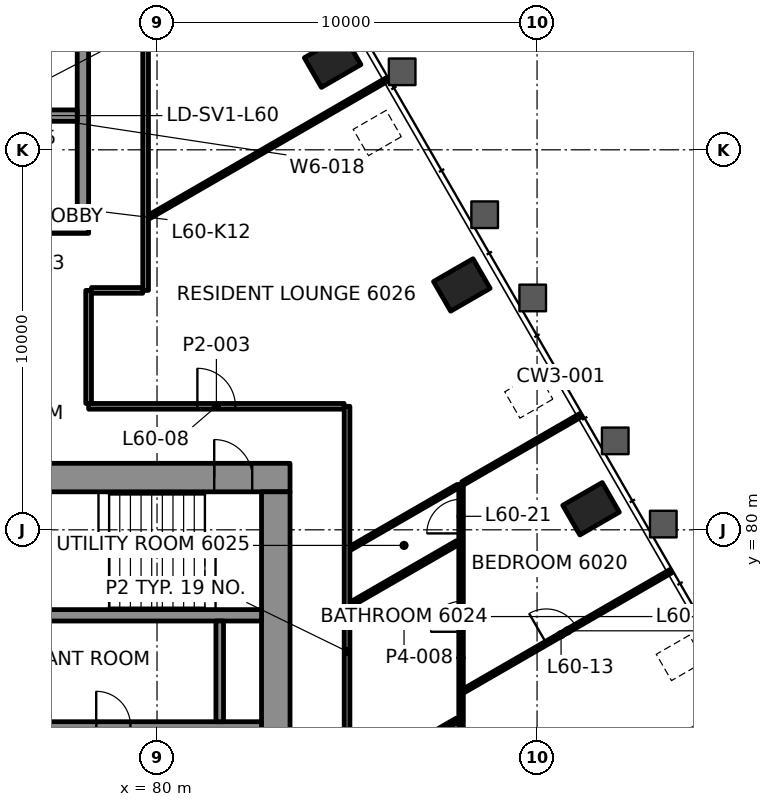
"""IFC4 building model, lengths in metres.
Left out: names, types, materials, properties, quantities, classifications, styles, units other than length and angle.
Written with IfcOpenShell. Run it as: python <this file> out.ifc"""

import sys

from ifc_helpers import new_model, si_unit, direction, frame, frame_2d, origin, origin_2d, place, context, subcontext, project, spatial, rectangle, hollow_rectangle, extrude, element, fill, save


model = new_model("IFC4")
c1 = context("Model", 3, precision=1e-05, world=origin(), true_north=direction((0.0, 1.0)))
c2 = subcontext(c1, "Body", "Model", "MODEL_VIEW")
j1 = project(units=[si_unit("LENGTHUNIT", "METRE"), si_unit("PLANEANGLEUNIT", "RADIAN")], contexts=[c1])
p1 = place(None, origin())
s1 = spatial("IfcSite", under=j1, at=p1, CompositionType="ELEMENT")
p2 = place(p1, origin())
s2 = spatial("IfcBuilding", under=s1, at=p2, CompositionType="ELEMENT")
p3 = place(p2, frame((0.0, 0.0, 256.6)))
s3 = spatial("IfcBuildingStorey", under=s2, at=p3, CompositionType="ELEMENT", Elevation=256.6)
for number, where, z_axis, x_axis in (
    (1, (94.821, 74.666, -0.0), (0.0, 0.0, 1.0), (-0.5, 0.866, 0.0)),
    (2, (91.421, 80.554, -0.0), (0.0, 0.0, 1.0), (-0.5, 0.866, 0.0)),
    (3, (88.021, 86.443, -0.0), (0.0, 0.0, 1.0), (-0.5, 0.866, 0.0)),
    (4, (84.621, 92.332, -0.0), (0.0, 0.0, 1.0), (-0.5, 0.866, 0.0)),
):
    element("IfcColumn", number, at=place(p3, frame(where, z_axis=z_axis, x_axis=x_axis)), inside=s3, PredefinedType="COLUMN", context=c2, shape_type="SweptSolid", body=[
        extrude(hollow_rectangle(XDim=0.9, YDim=1.2, WallThickness=0.06, at=origin_2d()), origin(), (0.0, 0.0, 1.0), 3.5),
    ])
p4 = place(p3, frame((66.5, 81.375, 0.0), z_axis=(0.0, 0.0, 1.0), x_axis=(1.0, 0.0, 0.0)))
e5 = element("IfcWall", 5, at=p4, inside=s3, PredefinedType="SHEAR", context=c2, shape_type="SweptSolid", body=[
    extrude(rectangle(XDim=17.0, YDim=0.75, at=frame_2d((8.5, 0.0))), origin(), (0.0, 0.0, 1.0), 3.3),
])
p5 = place(p4, frame((1.195, 0.0, 0.0)))
e6 = element("IfcOpeningElement", 6, at=p5, cuts=e5, PredefinedType="OPENING", context=c2, shape_type="SweptSolid", body=[
    extrude(rectangle(XDim=1.0, YDim=2.1, at=frame_2d((0.5, 1.05))), frame((0.0, 0.385, 0.0), z_axis=(0.0, -1.0, 0.0), x_axis=(1.0, 0.0, 0.0)), (0.0, 0.0, 1.0), 0.77),
])
p6 = place(p4, frame((15.005, 0.0, 0.0)))
e7 = element("IfcOpeningElement", 7, at=p6, cuts=e5, PredefinedType="OPENING", context=c2, shape_type="SweptSolid", body=[
    extrude(rectangle(XDim=1.0, YDim=2.1, at=frame_2d((0.5, 1.05))), frame((0.0, 0.385, 0.0), z_axis=(0.0, -1.0, 0.0), x_axis=(1.0, 0.0, 0.0)), (0.0, 0.0, 1.0), 0.77),
])
p7 = place(p4, frame((8.15, 0.0, 0.0)))
e8 = element("IfcOpeningElement", 8, at=p7, cuts=e5, PredefinedType="OPENING", context=c2, shape_type="SweptSolid", body=[
    extrude(rectangle(XDim=0.9, YDim=2.1, at=frame_2d((0.45, 1.05))), frame((0.0, 0.385, 0.0), z_axis=(0.0, -1.0, 0.0), x_axis=(1.0, 0.0, 0.0)), (0.0, 0.0, 1.0), 0.77),
])
p8 = place(p3, frame((83.125, 69.0, 0.0), z_axis=(0.0, 0.0, 1.0), x_axis=(0.0, 1.0, 0.0)))
e9 = element("IfcWall", 9, at=p8, inside=s3, PredefinedType="SHEAR", context=c2, shape_type="SweptSolid", body=[
    extrude(rectangle(XDim=12.0, YDim=0.75, at=frame_2d((6.0, 0.0))), origin(), (0.0, 0.0, 1.0), 3.3),
])
p9 = place(p8, frame((3.4, 0.0, 0.0)))
e10 = element("IfcOpeningElement", 10, at=p9, cuts=e9, PredefinedType="OPENING", context=c2, shape_type="SweptSolid", body=[
    extrude(rectangle(XDim=1.8, YDim=2.1, at=frame_2d((0.9, 1.05))), frame((0.0, 0.385, 0.0), z_axis=(0.0, -1.0, 0.0), x_axis=(1.0, 0.0, 0.0)), (0.0, 0.0, 1.0), 0.77),
])
p10 = place(p3, frame((67.25, 77.75, 0.0), z_axis=(0.0, 0.0, 1.0), x_axis=(1.0, 0.0, 0.0)))
e11 = element("IfcWall", 11, at=p10, inside=s3, PredefinedType="SHEAR", context=c2, shape_type="SweptSolid", body=[
    extrude(rectangle(XDim=15.5, YDim=0.3, at=frame_2d((7.75, 0.0))), origin(), (0.0, 0.0, 1.0), 3.3),
])
p11 = place(p10, frame((0.445, 0.0, 0.0)))
e12 = element("IfcOpeningElement", 12, at=p11, cuts=e11, PredefinedType="OPENING", context=c2, shape_type="SweptSolid", body=[
    extrude(rectangle(XDim=1.0, YDim=2.1, at=frame_2d((0.5, 1.05))), frame((0.0, 0.16, 0.0), z_axis=(0.0, -1.0, 0.0), x_axis=(1.0, 0.0, 0.0)), (0.0, 0.0, 1.0), 0.32),
])
p12 = place(p3, frame((71.8, 87.95, 0.0), z_axis=(0.0, 0.0, 1.0), x_axis=(1.0, 0.0, 0.0)))
e13 = element("IfcWall", 13, at=p12, inside=s3, PredefinedType="SHEAR", context=c2, shape_type="SweptSolid", body=[
    extrude(rectangle(XDim=6.4, YDim=0.3, at=frame_2d((3.2, 0.0))), origin(), (0.0, 0.0, 1.0), 3.3),
])
p13 = place(p12, frame((1.325, 0.0, 0.0)))
e14 = element("IfcOpeningElement", 14, at=p13, cuts=e13, PredefinedType="OPENING", context=c2, shape_type="SweptSolid", body=[
    extrude(rectangle(XDim=1.0, YDim=2.1, at=frame_2d((0.5, 1.05))), frame((0.0, 0.16, 0.0), z_axis=(0.0, -1.0, 0.0), x_axis=(1.0, 0.0, 0.0)), (0.0, 0.0, 1.0), 0.32),
])
p14 = place(p12, frame((4.125, 0.0, 0.0)))
e15 = element("IfcOpeningElement", 15, at=p14, cuts=e13, PredefinedType="OPENING", context=c2, shape_type="SweptSolid", body=[
    extrude(rectangle(XDim=1.2, YDim=2.1, at=frame_2d((0.6, 1.05))), frame((0.0, 0.16, 0.0), z_axis=(0.0, -1.0, 0.0), x_axis=(1.0, 0.0, 0.0)), (0.0, 0.0, 1.0), 0.32),
])
p15 = place(p3, frame((78.05, 88.1, 0.0), z_axis=(0.0, 0.0, 1.0), x_axis=(0.0, 1.0, 0.0)))
e16 = element("IfcWall", 16, at=p15, inside=s3, PredefinedType="SHEAR", context=c2, shape_type="SweptSolid", body=[
    extrude(rectangle(XDim=6.2, YDim=0.3, at=frame_2d((3.1, 0.0))), origin(), (0.0, 0.0, 1.0), 3.3),
])
p16 = place(p3, frame((75.3, 90.9, 0.0), z_axis=(0.0, 0.0, 1.0), x_axis=(1.0, 0.0, 0.0)))
e17 = element("IfcWall", 17, at=p16, inside=s3, PredefinedType="SHEAR", context=c2, shape_type="SweptSolid", body=[
    extrude(rectangle(XDim=2.6, YDim=0.3, at=frame_2d((1.3, 0.0))), origin(), (0.0, 0.0, 1.0), 3.3),
])
p17 = place(p16, frame((0.675, 0.0, 0.0)))
e18 = element("IfcOpeningElement", 18, at=p17, cuts=e17, PredefinedType="OPENING", context=c2, shape_type="SweptSolid", body=[
    extrude(rectangle(XDim=1.1, YDim=2.1, at=frame_2d((0.55, 1.05))), frame((0.0, 0.16, 0.0), z_axis=(0.0, -1.0, 0.0), x_axis=(1.0, 0.0, 0.0)), (0.0, 0.0, 1.0), 0.32),
])
p18 = place(p3, frame((78.2, 83.25, 0.0), z_axis=(0.0, 0.0, 1.0), x_axis=(1.0, 0.0, 0.0)))
e19 = element("IfcWall", 19, at=p18, inside=s3, PredefinedType="PARTITIONING", context=c2, shape_type="SweptSolid", body=[
    extrude(rectangle(XDim=6.725, YDim=0.15, at=frame_2d((3.362, 0.0))), origin(), (0.0, 0.0, 1.0), 2.7),
])
p19 = place(p18, frame((2.862, 0.0, 0.0)))
e20 = element("IfcOpeningElement", 20, at=p19, cuts=e19, PredefinedType="OPENING", context=c2, shape_type="SweptSolid", body=[
    extrude(rectangle(XDim=1.0, YDim=2.1, at=frame_2d((0.5, 1.05))), frame((0.0, 0.085, 0.0), z_axis=(0.0, -1.0, 0.0), x_axis=(1.0, 0.0, 0.0)), (0.0, 0.0, 1.0), 0.17),
])
p20 = place(p3, frame((78.275, 86.3, 0.0), z_axis=(0.0, 0.0, 1.0), x_axis=(1.0, 0.0, 0.0)))
e21 = element("IfcWall", 21, at=p20, inside=s3, PredefinedType="PARTITIONING", context=c2, shape_type="SweptSolid", body=[
    extrude(rectangle(XDim=1.35, YDim=0.15, at=frame_2d((0.675, 0.0))), origin(), (0.0, 0.0, 1.0), 2.7),
])
p21 = place(p3, frame((85.11, 73.379, 0.0), z_axis=(0.0, 0.0, 1.0), x_axis=(0.866000447062, 0.500043223821, 0.0)))
e22 = element("IfcWall", 22, at=p21, inside=s3, PredefinedType="PARTITIONING", context=c2, shape_type="SweptSolid", body=[
    extrude(rectangle(XDim=3.228, YDim=0.12, at=frame_2d((1.614, 0.0))), origin(), (0.0, 0.0, 1.0), 2.7),
])
p22 = place(p3, frame((88.086, 75.773, 0.0), z_axis=(0.0, 0.0, 1.0), x_axis=(0.866028229963, 0.499995104884, 0.0)))
e23 = element("IfcWall", 23, at=p22, inside=s3, PredefinedType="PARTITIONING", context=c2, shape_type="SweptSolid", body=[
    extrude(rectangle(XDim=6.278, YDim=0.1, at=frame_2d((3.139, 0.0))), origin(), (0.0, 0.0, 1.0), 2.688),
])
p23 = place(p22, frame((2.489, 0.0, 0.0)))
e24 = element("IfcOpeningElement", 24, at=p23, cuts=e23, PredefinedType="OPENING", context=c2, shape_type="SweptSolid", body=[
    extrude(rectangle(XDim=0.9, YDim=2.1, at=frame_2d((0.45, 1.05))), frame((0.0, 0.06, 0.0), z_axis=(0.0, -1.0, 0.0), x_axis=(1.0, 0.0, 0.0)), (0.0, 0.0, 1.0), 0.12),
])
p24 = place(p3, frame((85.109, 78.046, 0.0), z_axis=(0.0, 0.0, 1.0), x_axis=(0.866033195618, 0.499986503906, 0.0)))
e25 = element("IfcWall", 25, at=p24, inside=s3, PredefinedType="PARTITIONING", context=c2, shape_type="SweptSolid", body=[
    extrude(rectangle(XDim=3.228, YDim=0.12, at=frame_2d((1.614, 0.0))), origin(), (0.0, 0.0, 1.0), 2.7),
])
p25 = place(p3, frame((85.101, 79.523, 0.0), z_axis=(0.0, 0.0, 1.0), x_axis=(0.866029195513, 0.499993432475, 0.0)))
e26 = element("IfcWall", 26, at=p25, inside=s3, PredefinedType="PARTITIONING", context=c2, shape_type="SweptSolid", body=[
    extrude(rectangle(XDim=3.25, YDim=0.1, at=frame_2d((1.625, 0.0))), origin(), (0.0, 0.0, 1.0), 2.7),
])
p26 = place(p3, frame((79.801, 88.241, 0.0), z_axis=(0.0, 0.0, 1.0), x_axis=(0.866016076598, 0.500016154812, 0.0)))
e27 = element("IfcWall", 27, at=p26, inside=s3, PredefinedType="PARTITIONING", context=c2, shape_type="SweptSolid", body=[
    extrude(rectangle(XDim=7.219, YDim=0.1, at=frame_2d((3.61, 0.0))), origin(), (0.0, 0.0, 1.0), 2.688),
])
p27 = place(p3, frame((88.0, 72.067, 0.0), z_axis=(0.0, 0.0, 1.0), x_axis=(0.0, 1.0, 0.0)))
e28 = element("IfcWall", 28, at=p27, inside=s3, PredefinedType="PARTITIONING", context=c2, shape_type="SweptSolid", body=[
    extrude(rectangle(XDim=9.13, YDim=0.12, at=frame_2d((4.565, 0.0))), origin(), (0.0, 0.0, 1.0), 2.7),
])
p28 = place(p27, frame((1.142, 0.0, 0.0)))
e29 = element("IfcOpeningElement", 29, at=p28, cuts=e28, PredefinedType="OPENING", context=c2, shape_type="SweptSolid", body=[
    extrude(rectangle(XDim=0.9, YDim=2.1, at=frame_2d((0.45, 1.05))), frame((0.0, 0.07, 0.0), z_axis=(0.0, -1.0, 0.0), x_axis=(1.0, 0.0, 0.0)), (0.0, 0.0, 1.0), 0.14),
])
p29 = place(p27, frame((5.25, 0.0, 0.0)))
e30 = element("IfcOpeningElement", 30, at=p29, cuts=e28, PredefinedType="OPENING", context=c2, shape_type="SweptSolid", body=[
    extrude(rectangle(XDim=0.8, YDim=2.1, at=frame_2d((0.4, 1.05))), frame((0.0, 0.07, 0.0), z_axis=(0.0, -1.0, 0.0), x_axis=(1.0, 0.0, 0.0)), (0.0, 0.0, 1.0), 0.14),
])
p30 = place(p27, frame((7.838, 0.0, 0.0)))
e31 = element("IfcOpeningElement", 31, at=p30, cuts=e28, PredefinedType="OPENING", context=c2, shape_type="SweptSolid", body=[
    extrude(rectangle(XDim=0.9, YDim=2.1, at=frame_2d((0.45, 1.05))), frame((0.0, 0.07, 0.0), z_axis=(0.0, -1.0, 0.0), x_axis=(1.0, 0.0, 0.0)), (0.0, 0.0, 1.0), 0.14),
])
p31 = place(p3, frame((85.0, 70.352, 0.0), z_axis=(0.0, 0.0, 1.0), x_axis=(0.0, 1.0, 0.0)))
e32 = element("IfcWall", 32, at=p31, inside=s3, PredefinedType="PARTITIONING", context=c2, shape_type="SweptSolid", body=[
    extrude(rectangle(XDim=12.897, YDim=0.15, at=frame_2d((6.449, 0.0))), origin(), (0.0, 0.0, 1.0), 2.7),
])
p32 = place(p3, frame((79.7, 86.301, 0.0), z_axis=(0.0, 0.0, 1.0), x_axis=(0.0, 1.0, 0.0)))
e33 = element("IfcWall", 33, at=p32, inside=s3, PredefinedType="PARTITIONING", context=c2, shape_type="SweptSolid", body=[
    extrude(rectangle(XDim=9.799, YDim=0.15, at=frame_2d((4.899, 0.0))), origin(), (0.0, 0.0, 1.0), 2.7),
])
p33 = place(p3, frame((78.2, 83.325, 0.0), z_axis=(0.0, 0.0, 1.0), x_axis=(0.0, 1.0, 0.0)))
e34 = element("IfcWall", 34, at=p33, inside=s3, PredefinedType="PARTITIONING", context=c2, shape_type="SweptSolid", body=[
    extrude(rectangle(XDim=2.975, YDim=0.15, at=frame_2d((1.488, 0.0))), origin(), (0.0, 0.0, 1.0), 2.622),
])
p34 = place(p3, frame((88.045, 81.223, 0.0), z_axis=(0.0, 0.0, 1.0), x_axis=(0.866020209003, 0.500008997517, 0.0)))
e35 = element("IfcWall", 35, at=p34, inside=s3, PredefinedType="PARTITIONING", context=c2, shape_type="SweptSolid", body=[
    extrude(rectangle(XDim=3.589, YDim=0.1, at=frame_2d((1.795, 0.0))), origin(), (0.0, 0.0, 1.0), 2.688),
])
p35 = place(p3, frame((76.2, 74.85, 0.0), z_axis=(0.0, 0.0, 1.0), x_axis=(1.0, 0.0, 0.0)))
e36 = element("IfcWall", 36, at=p35, inside=s3, PredefinedType="PARTITIONING", context=c2, shape_type="SweptSolid", body=[
    extrude(rectangle(XDim=6.55, YDim=0.2, at=frame_2d((3.275, 0.0))), origin(), (0.0, 0.0, 1.0), 3.3),
])
p36 = place(p35, frame((2.2, 0.0, 0.0)))
e37 = element("IfcOpeningElement", 37, at=p36, cuts=e36, PredefinedType="OPENING", context=c2, shape_type="SweptSolid", body=[
    extrude(rectangle(XDim=0.9, YDim=2.1, at=frame_2d((0.45, 1.05))), frame((0.0, 0.11, 0.0), z_axis=(0.0, -1.0, 0.0), x_axis=(1.0, 0.0, 0.0)), (0.0, 0.0, 1.0), 0.22),
])
p37 = place(p3, frame((81.65, 74.95, 0.0), z_axis=(0.0, 0.0, 1.0), x_axis=(0.0, 1.0, 0.0)))
e38 = element("IfcWall", 38, at=p37, inside=s3, PredefinedType="PARTITIONING", context=c2, shape_type="SweptSolid", body=[
    extrude(rectangle(XDim=2.65, YDim=0.2, at=frame_2d((1.325, 0.0))), origin(), (0.0, 0.0, 1.0), 3.3),
])
p38 = place(p19, origin())
e39 = element("IfcDoor", 39, at=p38, inside=s3, OperationType="SINGLE_SWING_LEFT", PredefinedType="DOOR", context=c2, shape_type="SweptSolid", body=[
    extrude(rectangle(XDim=1.0, YDim=2.1, at=frame_2d((0.5, 1.05))), frame((0.0, 0.025, 0.0), z_axis=(0.0, -1.0, 0.0), x_axis=(1.0, 0.0, 0.0)), (0.0, 0.0, 1.0), 0.05),
])
fill(e20, e39)
p39 = place(p23, origin())
e40 = element("IfcDoor", 40, at=p39, inside=s3, OperationType="SINGLE_SWING_LEFT", PredefinedType="DOOR", context=c2, shape_type="SweptSolid", body=[
    extrude(rectangle(XDim=0.9, YDim=2.1, at=frame_2d((0.45, 1.05))), frame((0.0, 0.025, 0.0), z_axis=(0.0, -1.0, 0.0), x_axis=(1.0, 0.0, 0.0)), (0.0, 0.0, 1.0), 0.05),
])
fill(e24, e40)
p40 = place(p29, origin())
e41 = element("IfcDoor", 41, at=p40, inside=s3, OperationType="SINGLE_SWING_LEFT", PredefinedType="DOOR", context=c2, shape_type="SweptSolid", body=[
    extrude(rectangle(XDim=0.8, YDim=2.1, at=frame_2d((0.4, 1.05))), frame((0.0, 0.025, 0.0), z_axis=(0.0, -1.0, 0.0), x_axis=(1.0, 0.0, 0.0)), (0.0, 0.0, 1.0), 0.05),
])
fill(e30, e41)
p41 = place(p30, origin())
e42 = element("IfcDoor", 42, at=p41, inside=s3, OperationType="SINGLE_SWING_RIGHT", PredefinedType="DOOR", context=c2, shape_type="SweptSolid", body=[
    extrude(rectangle(XDim=0.9, YDim=2.1, at=frame_2d((0.45, 1.05))), frame((0.0, 0.025, 0.0), z_axis=(0.0, -1.0, 0.0), x_axis=(1.0, 0.0, 0.0)), (0.0, 0.0, 1.0), 0.05),
])
fill(e31, e42)
p42 = place(p6, origin())
e43 = element("IfcDoor", 43, at=p42, inside=s3, OperationType="SINGLE_SWING_LEFT", PredefinedType="DOOR", context=c2, shape_type="SweptSolid", body=[
    extrude(rectangle(XDim=1.0, YDim=2.1, at=frame_2d((0.5, 1.05))), frame((0.0, 0.095, 0.0), z_axis=(0.0, -1.0, 0.0), x_axis=(1.0, 0.0, 0.0)), (0.0, 0.0, 1.0), 0.19),
])
fill(e7, e43)
p43 = place(p36, origin())
e44 = element("IfcDoor", 44, at=p43, inside=s3, OperationType="SINGLE_SWING_LEFT", PredefinedType="DOOR", context=c2, shape_type="SweptSolid", body=[
    extrude(rectangle(XDim=0.9, YDim=2.1, at=frame_2d((0.45, 1.05))), frame((0.0, 0.025, 0.0), z_axis=(0.0, -1.0, 0.0), x_axis=(1.0, 0.0, 0.0)), (0.0, 0.0, 1.0), 0.05),
])
fill(e37, e44)
save(model, sys.argv[1])
